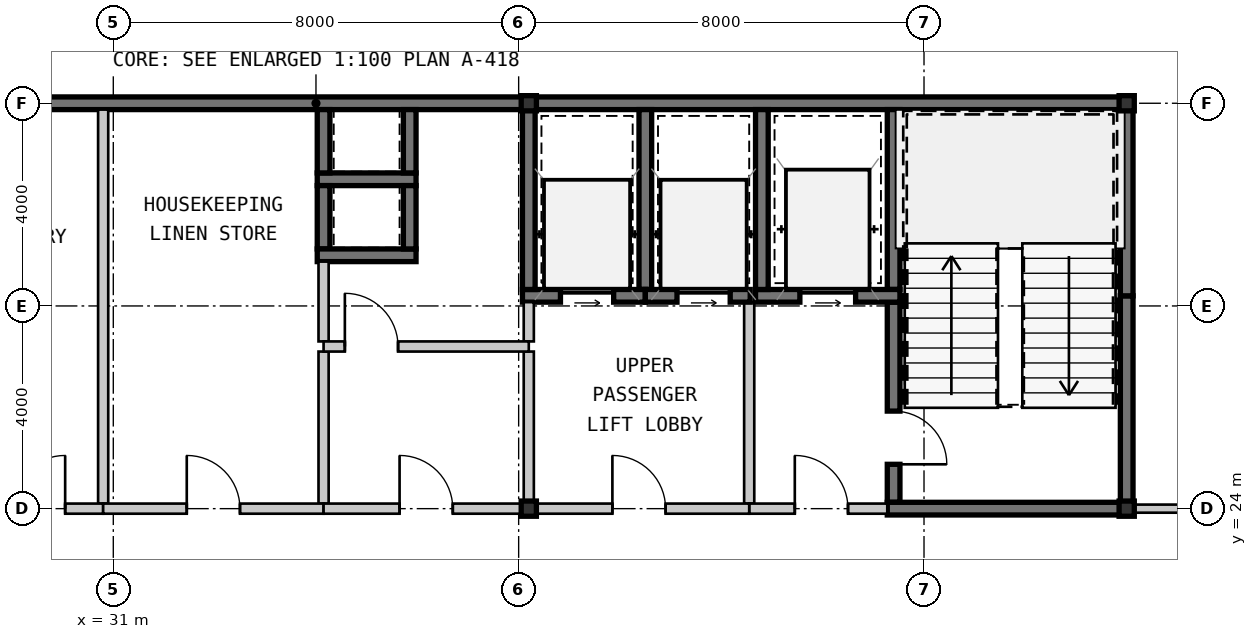
"""IFC4 building model, lengths in metres.
Left out: names, types, materials, properties, quantities, classifications, styles, units other than length and angle.
Written with IfcOpenShell. Run it as: python <this file> out.ifc"""

import sys

from ifc_helpers import new_model, si_unit, direction, frame, frame_2d, origin, origin_2d, place, context, subcontext, project, spatial, rectangle, hollow_rectangle, extrude, source, transform, mapped, element, fill, save


model = new_model("IFC4")
c1 = context("Model", 3, precision=1e-05, world=origin(), true_north=direction((0.0, 1.0)))
c2 = subcontext(c1, "Body", "Model", "MODEL_VIEW")
j1 = project(units=[si_unit("LENGTHUNIT", "METRE"), si_unit("PLANEANGLEUNIT", "RADIAN")], contexts=[c1])
p1 = place(None, origin())
s1 = spatial("IfcSite", under=j1, at=p1, CompositionType="ELEMENT")
p2 = place(p1, origin())
s2 = spatial("IfcBuilding", under=s1, at=p2, CompositionType="ELEMENT")
p3 = place(p2, frame((0.0, 0.0, 239.75)))
s3 = spatial("IfcBuildingStorey", under=s2, at=p3, CompositionType="ELEMENT", Elevation=239.75)
m1 = source(origin(), c2, "Body", "SweptSolid", [
    extrude(hollow_rectangle(XDim=0.3, YDim=0.3, WallThickness=0.012, at=origin_2d()), origin(), (0.0, 0.0, 1.0), 3.15),
])
for number, where, z_axis, x_axis in (
    (1, (39.2, 24.0, 0.0), (0.0, 0.0, 1.0), (1.0, 0.0, 0.0)),
    (2, (51.0, 24.0, 0.0), (0.0, 0.0, 1.0), (1.0, 0.0, 0.0)),
    (3, (39.2, 32.0, 0.0), (0.0, 0.0, 1.0), (1.0, 0.0, 0.0)),
    (4, (51.0, 32.0, 0.0), (0.0, 0.0, 1.0), (1.0, 0.0, 0.0)),
):
    element("IfcColumn", number, at=place(p3, frame(where, z_axis=z_axis, x_axis=x_axis)), inside=s3, PredefinedType="COLUMN", context=c2, shape_type="MappedRepresentation", body=[
        mapped(m1, transform((0.0, 0.0, 0.0), scale=1.0)),
    ])
m2 = source(origin(), c2, "Body", "SweptSolid", [
    extrude(rectangle(XDim=11.2, YDim=0.25, at=frame_2d((5.6, 0.0))), origin(), (0.0, 0.0, 1.0), 2.93),
])
p4 = place(p3, frame((28.0, 32.0, 0.0), z_axis=(0.0, 0.0, 1.0), x_axis=(1.0, 0.0, 0.0)))
e5 = element("IfcWall", 5, at=p4, inside=s3, PredefinedType="SHEAR", context=c2, shape_type="MappedRepresentation", body=[
    mapped(m2, transform((0.0, 0.0, 0.0), scale=1.0)),
])
m3 = source(origin(), c2, "Body", "SweptSolid", [
    extrude(rectangle(XDim=11.925, YDim=0.25, at=frame_2d((5.962, 0.0))), origin(), (0.0, 0.0, 1.0), 2.93),
])
p5 = place(p3, frame((39.2, 32.0, 0.0), z_axis=(0.0, 0.0, 1.0), x_axis=(1.0, 0.0, 0.0)))
e6 = element("IfcWall", 6, at=p5, inside=s3, PredefinedType="SHEAR", context=c2, shape_type="MappedRepresentation", body=[
    mapped(m3, transform((0.0, 0.0, 0.0), scale=1.0)),
])
m4 = source(origin(), c2, "Body", "SweptSolid", [
    extrude(rectangle(XDim=4.075, YDim=0.25, at=frame_2d((2.038, 0.0))), origin(), (0.0, 0.0, 1.0), 2.93),
])
p6 = place(p3, frame((51.0, 24.125, 0.0), z_axis=(0.0, 0.0, 1.0), x_axis=(0.0, 1.0, 0.0)))
e7 = element("IfcWall", 7, at=p6, inside=s3, PredefinedType="SHEAR", context=c2, shape_type="MappedRepresentation", body=[
    mapped(m4, transform((0.0, 0.0, 0.0), scale=1.0)),
])
m5 = source(origin(), c2, "Body", "SweptSolid", [
    extrude(rectangle(XDim=3.675, YDim=0.25, at=frame_2d((1.837, 0.0))), origin(), (0.0, 0.0, 1.0), 2.93),
])
p7 = place(p3, frame((51.0, 28.2, 0.0), z_axis=(0.0, 0.0, 1.0), x_axis=(0.0, 1.0, 0.0)))
e8 = element("IfcWall", 8, at=p7, inside=s3, PredefinedType="SHEAR", context=c2, shape_type="MappedRepresentation", body=[
    mapped(m5, transform((0.0, 0.0, 0.0), scale=1.0)),
])
m6 = source(origin(), c2, "Body", "SweptSolid", [
    extrude(rectangle(XDim=3.55, YDim=0.25, at=frame_2d((1.775, 0.0))), origin(), (0.0, 0.0, 1.0), 2.93),
])
p8 = place(p3, frame((46.4, 31.875, 0.0), z_axis=(0.0, 0.0, 1.0), x_axis=(0.0, -1.0, 0.0)))
e9 = element("IfcWall", 9, at=p8, inside=s3, PredefinedType="SHEAR", context=c2, shape_type="MappedRepresentation", body=[
    mapped(m6, transform((0.0, 0.0, 0.0), scale=1.0)),
])
m7 = source(origin(), c2, "Body", "SweptSolid", [
    extrude(rectangle(XDim=3.95, YDim=0.25, at=frame_2d((1.975, 0.0))), origin(), (0.0, 0.0, 1.0), 2.93),
])
p9 = place(p3, frame((46.4, 28.075, 0.0), z_axis=(0.0, 0.0, 1.0), x_axis=(0.0, -1.0, 0.0)))
e10 = element("IfcWall", 10, at=p9, inside=s3, PredefinedType="SHEAR", context=c2, shape_type="MappedRepresentation", body=[
    mapped(m7, transform((0.0, 0.0, 0.0), scale=1.0)),
])
m8 = source(origin(), c2, "Body", "SweptSolid", [
    extrude(rectangle(XDim=1.05, YDim=2.1, at=frame_2d((0.525, 1.05))), frame((0.0, 0.135, 0.0), z_axis=(0.0, -1.0, 0.0), x_axis=(1.0, 0.0, 0.0)), (0.0, 0.0, 1.0), 0.27),
])
p10 = place(p9, frame((2.15, 0.0, 0.0)))
e11 = element("IfcOpeningElement", 11, at=p10, cuts=e10, PredefinedType="OPENING", context=c2, shape_type="MappedRepresentation", body=[
    mapped(m8, transform((0.0, 0.0, 0.0), scale=1.0)),
])
m9 = source(origin(), c2, "Body", "SweptSolid", [
    extrude(rectangle(XDim=4.85, YDim=0.25, at=frame_2d((2.425, 0.0))), origin(), (0.0, 0.0, 1.0), 2.93),
])
p11 = place(p3, frame((46.275, 24.0, 0.0), z_axis=(0.0, 0.0, 1.0), x_axis=(1.0, 0.0, 0.0)))
e12 = element("IfcWall", 12, at=p11, inside=s3, PredefinedType="SHEAR", context=c2, shape_type="MappedRepresentation", body=[
    mapped(m9, transform((0.0, 0.0, 0.0), scale=1.0)),
])
m10 = source(origin(), c2, "Body", "SweptSolid", [
    extrude(rectangle(XDim=2.85, YDim=0.25, at=frame_2d((1.425, 0.0))), origin(), (0.0, 0.0, 1.0), 2.93),
])
p12 = place(p3, frame((43.675, 28.2, 0.0), z_axis=(0.0, 0.0, 1.0), x_axis=(1.0, 0.0, 0.0)))
e13 = element("IfcWall", 13, at=p12, inside=s3, PredefinedType="SHEAR", context=c2, shape_type="MappedRepresentation", body=[
    mapped(m10, transform((0.0, 0.0, 0.0), scale=1.0)),
])
m11 = source(origin(), c2, "Body", "SweptSolid", [
    extrude(rectangle(XDim=1.1, YDim=2.15, at=frame_2d((0.55, 1.075))), frame((0.0, 0.135, 0.0), z_axis=(0.0, -1.0, 0.0), x_axis=(1.0, 0.0, 0.0)), (0.0, 0.0, 1.0), 0.27),
])
p13 = place(p12, frame((0.875, 0.0, 0.0)))
e14 = element("IfcOpeningElement", 14, at=p13, cuts=e13, PredefinedType="OPENING", context=c2, shape_type="MappedRepresentation", body=[
    mapped(m11, transform((0.0, 0.0, 0.0), scale=1.0)),
])
p14 = place(p3, frame((43.8, 31.875, 0.0), z_axis=(0.0, 0.0, 1.0), x_axis=(0.0, -1.0, 0.0)))
e15 = element("IfcWall", 15, at=p14, inside=s3, PredefinedType="SHEAR", context=c2, shape_type="MappedRepresentation", body=[
    mapped(m6, transform((0.0, 0.0, 0.0), scale=1.0)),
])
m12 = source(origin(), c2, "Body", "SweptSolid", [
    extrude(rectangle(XDim=3.975, YDim=0.2, at=frame_2d((1.987, 0.0))), origin(), (0.0, 0.0, 1.0), 2.93),
])
p15 = place(p3, frame((43.55, 28.075, 0.0), z_axis=(0.0, 0.0, 1.0), x_axis=(0.0, -1.0, 0.0)))
e16 = element("IfcWall", 16, at=p15, inside=s3, PredefinedType="SOLIDWALL", context=c2, shape_type="MappedRepresentation", body=[
    mapped(m12, transform((0.0, 0.0, 0.0), scale=1.0)),
])
m13 = source(origin(), c2, "Body", "SweptSolid", [
    extrude(rectangle(XDim=2.725, YDim=0.2, at=frame_2d((1.362, 0.0))), origin(), (0.0, 0.0, 1.0), 2.397),
])
p16 = place(p3, frame((43.55, 24.0, 0.0), z_axis=(0.0, 0.0, 1.0), x_axis=(1.0, 0.0, 0.0)))
e17 = element("IfcWall", 17, at=p16, inside=s3, PredefinedType="SOLIDWALL", context=c2, shape_type="MappedRepresentation", body=[
    mapped(m13, transform((0.0, 0.0, 0.0), scale=1.0)),
])
m14 = source(origin(), c2, "Body", "SweptSolid", [
    extrude(rectangle(XDim=1.05, YDim=2.1, at=frame_2d((0.525, 1.05))), frame((0.0, 0.11, 0.0), z_axis=(0.0, -1.0, 0.0), x_axis=(1.0, 0.0, 0.0)), (0.0, 0.0, 1.0), 0.22),
])
p17 = place(p16, frame((0.9, 0.0, 0.0)))
e18 = element("IfcOpeningElement", 18, at=p17, cuts=e17, PredefinedType="OPENING", context=c2, shape_type="MappedRepresentation", body=[
    mapped(m14, transform((0.0, 0.0, 0.0), scale=1.0)),
])
m15 = source(origin(), c2, "Body", "SweptSolid", [
    extrude(rectangle(XDim=1.95, YDim=0.25, at=frame_2d((0.975, 0.0))), origin(), (0.0, 0.0, 1.0), 2.93),
])
p18 = place(p3, frame((35.025, 30.5, 0.0), z_axis=(0.0, 0.0, 1.0), x_axis=(1.0, 0.0, 0.0)))
e19 = element("IfcWall", 19, at=p18, inside=s3, PredefinedType="SHEAR", context=c2, shape_type="MappedRepresentation", body=[
    mapped(m15, transform((0.0, 0.0, 0.0), scale=1.0)),
])
m16 = source(origin(), c2, "Body", "SweptSolid", [
    extrude(rectangle(XDim=1.25, YDim=0.25, at=frame_2d((0.625, 0.0))), origin(), (0.0, 0.0, 1.0), 2.93),
])
for number, where, z_axis, x_axis in (
    (20, (35.15, 31.875, 0.0), (0.0, 0.0, 1.0), (0.0, -1.0, 0.0)),
    (21, (36.85, 30.625, 0.0), (0.0, 0.0, 1.0), (0.0, 1.0, 0.0)),
    (22, (35.15, 30.375, 0.0), (0.0, 0.0, 1.0), (0.0, -1.0, 0.0)),
):
    element("IfcWall", number, at=place(p3, frame(where, z_axis=z_axis, x_axis=x_axis)), inside=s3, PredefinedType="SHEAR", context=c2, shape_type="MappedRepresentation", body=[
        mapped(m16, transform((0.0, 0.0, 0.0), scale=1.0)),
    ])
p19 = place(p3, frame((35.025, 29.0, 0.0), z_axis=(0.0, 0.0, 1.0), x_axis=(1.0, 0.0, 0.0)))
e23 = element("IfcWall", 23, at=p19, inside=s3, PredefinedType="SHEAR", context=c2, shape_type="MappedRepresentation", body=[
    mapped(m15, transform((0.0, 0.0, 0.0), scale=1.0)),
])
p20 = place(p3, frame((36.85, 29.125, 0.0), z_axis=(0.0, 0.0, 1.0), x_axis=(0.0, 1.0, 0.0)))
e24 = element("IfcWall", 24, at=p20, inside=s3, PredefinedType="SHEAR", context=c2, shape_type="MappedRepresentation", body=[
    mapped(m16, transform((0.0, 0.0, 0.0), scale=1.0)),
])
p21 = place(p3, frame((41.5, 28.325, 0.0), z_axis=(0.0, 0.0, 1.0), x_axis=(0.0, 1.0, 0.0)))
e25 = element("IfcWall", 25, at=p21, inside=s3, PredefinedType="SHEAR", context=c2, shape_type="MappedRepresentation", body=[
    mapped(m6, transform((0.0, 0.0, 0.0), scale=1.0)),
])
m17 = source(origin(), c2, "Body", "SweptSolid", [
    extrude(rectangle(XDim=2.425, YDim=0.25, at=frame_2d((1.212, 0.0))), origin(), (0.0, 0.0, 1.0), 2.93),
])
p22 = place(p3, frame((39.075, 28.2, 0.0), z_axis=(0.0, 0.0, 1.0), x_axis=(1.0, 0.0, 0.0)))
e26 = element("IfcWall", 26, at=p22, inside=s3, PredefinedType="SHEAR", context=c2, shape_type="MappedRepresentation", body=[
    mapped(m17, transform((0.0, 0.0, 0.0), scale=1.0)),
])
m18 = source(origin(), c2, "Body", "SweptSolid", [
    extrude(rectangle(XDim=1.05, YDim=2.15, at=frame_2d((0.525, 1.075))), frame((0.0, 0.135, 0.0), z_axis=(0.0, -1.0, 0.0), x_axis=(1.0, 0.0, 0.0)), (0.0, 0.0, 1.0), 0.27),
])
p23 = place(p22, frame((0.75, 0.0, 0.0)))
e27 = element("IfcOpeningElement", 27, at=p23, cuts=e26, PredefinedType="OPENING", context=c2, shape_type="MappedRepresentation", body=[
    mapped(m18, transform((0.0, 0.0, 0.0), scale=1.0)),
])
p24 = place(p3, frame((39.2, 31.875, 0.0), z_axis=(0.0, 0.0, 1.0), x_axis=(0.0, -1.0, 0.0)))
e28 = element("IfcWall", 28, at=p24, inside=s3, PredefinedType="SHEAR", context=c2, shape_type="MappedRepresentation", body=[
    mapped(m6, transform((0.0, 0.0, 0.0), scale=1.0)),
])
m19 = source(origin(), c2, "Body", "SweptSolid", [
    extrude(rectangle(XDim=2.07, YDim=0.25, at=frame_2d((1.035, 0.0))), origin(), (0.0, 0.0, 1.0), 2.93),
])
p25 = place(p3, frame((41.5, 28.2, 0.0), z_axis=(0.0, 0.0, 1.0), x_axis=(1.0, 0.0, 0.0)))
e29 = element("IfcWall", 29, at=p25, inside=s3, PredefinedType="SHEAR", context=c2, shape_type="MappedRepresentation", body=[
    mapped(m19, transform((0.0, 0.0, 0.0), scale=1.0)),
])
p26 = place(p25, frame((0.625, 0.0, 0.0)))
e30 = element("IfcOpeningElement", 30, at=p26, cuts=e29, PredefinedType="OPENING", context=c2, shape_type="MappedRepresentation", body=[
    mapped(m18, transform((0.0, 0.0, 0.0), scale=1.0)),
])
m20 = source(origin(), c2, "Body", "SweptSolid", [
    extrude(rectangle(XDim=3.0, YDim=0.2, at=frame_2d((1.5, 0.0))), origin(), (0.0, 0.0, 1.0), 2.47),
])
p27 = place(p3, frame((39.2, 24.1, 0.0), z_axis=(0.0, 0.0, 1.0), x_axis=(0.0, 1.0, 0.0)))
e31 = element("IfcWall", 31, at=p27, inside=s3, PredefinedType="SOLIDWALL", context=c2, shape_type="MappedRepresentation", body=[
    mapped(m20, transform((0.0, 0.0, 0.0), scale=1.0)),
])
m21 = source(origin(), c2, "Body", "SweptSolid", [
    extrude(rectangle(XDim=0.775, YDim=0.2, at=frame_2d((0.387, 0.0))), origin(), (0.0, 0.0, 1.0), 2.47),
])
p28 = place(p3, frame((39.2, 27.3, 0.0), z_axis=(0.0, 0.0, 1.0), x_axis=(0.0, 1.0, 0.0)))
e32 = element("IfcWall", 32, at=p28, inside=s3, PredefinedType="SOLIDWALL", context=c2, shape_type="MappedRepresentation", body=[
    mapped(m21, transform((0.0, 0.0, 0.0), scale=1.0)),
])
m22 = source(origin(), c2, "Body", "SweptSolid", [
    extrude(rectangle(XDim=4.35, YDim=0.2, at=frame_2d((2.175, 0.0))), origin(), (0.0, 0.0, 1.0), 2.397),
])
p29 = place(p3, frame((43.55, 24.0, 0.0), z_axis=(0.0, 0.0, 1.0), x_axis=(-1.0, 0.0, 0.0)))
e33 = element("IfcWall", 33, at=p29, inside=s3, PredefinedType="SOLIDWALL", context=c2, shape_type="MappedRepresentation", body=[
    mapped(m22, transform((0.0, 0.0, 0.0), scale=1.0)),
])
p30 = place(p29, frame((1.65, 0.0, 0.0)))
e34 = element("IfcOpeningElement", 34, at=p30, cuts=e33, PredefinedType="OPENING", context=c2, shape_type="MappedRepresentation", body=[
    mapped(m14, transform((0.0, 0.0, 0.0), scale=1.0)),
])
m23 = source(origin(), c2, "Body", "SweptSolid", [
    extrude(rectangle(XDim=7.775, YDim=0.2, at=frame_2d((3.887, 0.0))), origin(), (0.0, 0.0, 1.0), 2.93),
])
p31 = place(p3, frame((30.8, 31.875, 0.0), z_axis=(0.0, 0.0, 1.0), x_axis=(0.0, -1.0, 0.0)))
e35 = element("IfcWall", 35, at=p31, inside=s3, PredefinedType="SOLIDWALL", context=c2, shape_type="MappedRepresentation", body=[
    mapped(m23, transform((0.0, 0.0, 0.0), scale=1.0)),
])
m24 = source(origin(), c2, "Body", "SweptSolid", [
    extrude(rectangle(XDim=4.35, YDim=0.2, at=frame_2d((2.175, 0.0))), origin(), (0.0, 0.0, 1.0), 2.47),
])
p32 = place(p3, frame((30.8, 24.0, 0.0), z_axis=(0.0, 0.0, 1.0), x_axis=(-1.0, 0.0, 0.0)))
e36 = element("IfcWall", 36, at=p32, inside=s3, PredefinedType="SOLIDWALL", context=c2, shape_type="MappedRepresentation", body=[
    mapped(m24, transform((0.0, 0.0, 0.0), scale=1.0)),
])
p33 = place(p32, frame((0.75, 0.0, 0.0)))
e37 = element("IfcOpeningElement", 37, at=p33, cuts=e36, PredefinedType="OPENING", context=c2, shape_type="MappedRepresentation", body=[
    mapped(m14, transform((0.0, 0.0, 0.0), scale=1.0)),
])
m25 = source(origin(), c2, "Body", "SweptSolid", [
    extrude(rectangle(XDim=3.0, YDim=0.2, at=frame_2d((1.5, 0.0))), origin(), (0.0, 0.0, 1.0), 2.93),
])
p34 = place(p3, frame((35.15, 27.1, 0.0), z_axis=(0.0, 0.0, 1.0), x_axis=(0.0, -1.0, 0.0)))
e38 = element("IfcWall", 38, at=p34, inside=s3, PredefinedType="SOLIDWALL", context=c2, shape_type="MappedRepresentation", body=[
    mapped(m25, transform((0.0, 0.0, 0.0), scale=1.0)),
])
m26 = source(origin(), c2, "Body", "SweptSolid", [
    extrude(rectangle(XDim=1.575, YDim=0.2, at=frame_2d((0.788, 0.0))), origin(), (0.0, 0.0, 1.0), 2.93),
])
p35 = place(p3, frame((35.15, 28.875, 0.0), z_axis=(0.0, 0.0, 1.0), x_axis=(0.0, -1.0, 0.0)))
e39 = element("IfcWall", 39, at=p35, inside=s3, PredefinedType="SOLIDWALL", context=c2, shape_type="MappedRepresentation", body=[
    mapped(m26, transform((0.0, 0.0, 0.0), scale=1.0)),
])
m27 = source(origin(), c2, "Body", "SweptSolid", [
    extrude(rectangle(XDim=4.35, YDim=0.2, at=frame_2d((2.175, 0.0))), origin(), (0.0, 0.0, 1.0), 2.47),
])
p36 = place(p3, frame((35.15, 24.0, 0.0), z_axis=(0.0, 0.0, 1.0), x_axis=(-1.0, 0.0, 0.0)))
e40 = element("IfcWall", 40, at=p36, inside=s3, PredefinedType="SOLIDWALL", context=c2, shape_type="MappedRepresentation", body=[
    mapped(m27, transform((0.0, 0.0, 0.0), scale=1.0)),
])
p37 = place(p36, frame((1.65, 0.0, 0.0)))
e41 = element("IfcOpeningElement", 41, at=p37, cuts=e40, PredefinedType="OPENING", context=c2, shape_type="MappedRepresentation", body=[
    mapped(m14, transform((0.0, 0.0, 0.0), scale=1.0)),
])
m28 = source(origin(), c2, "Body", "SweptSolid", [
    extrude(rectangle(XDim=4.05, YDim=0.2, at=frame_2d((2.025, 0.0))), origin(), (0.0, 0.0, 1.0), 2.93),
])
p38 = place(p3, frame((35.15, 27.2, 0.0), z_axis=(0.0, 0.0, 1.0), x_axis=(1.0, 0.0, 0.0)))
e42 = element("IfcWall", 42, at=p38, inside=s3, PredefinedType="SOLIDWALL", context=c2, shape_type="MappedRepresentation", body=[
    mapped(m28, transform((0.0, 0.0, 0.0), scale=1.0)),
])
p39 = place(p38, frame((0.42, 0.0, 0.0)))
e43 = element("IfcOpeningElement", 43, at=p39, cuts=e42, PredefinedType="OPENING", context=c2, shape_type="MappedRepresentation", body=[
    mapped(m14, transform((0.0, 0.0, 0.0), scale=1.0)),
])
m29 = source(origin(), c2, "Body", "SweptSolid", [
    extrude(rectangle(XDim=4.05, YDim=0.2, at=frame_2d((2.025, 0.0))), origin(), (0.0, 0.0, 1.0), 2.47),
])
p40 = place(p3, frame((39.2, 24.0, 0.0), z_axis=(0.0, 0.0, 1.0), x_axis=(-1.0, 0.0, 0.0)))
e44 = element("IfcWall", 44, at=p40, inside=s3, PredefinedType="SOLIDWALL", context=c2, shape_type="MappedRepresentation", body=[
    mapped(m29, transform((0.0, 0.0, 0.0), scale=1.0)),
])
p41 = place(p40, frame((1.5, 0.0, 0.0)))
e45 = element("IfcOpeningElement", 45, at=p41, cuts=e44, PredefinedType="OPENING", context=c2, shape_type="MappedRepresentation", body=[
    mapped(m14, transform((0.0, 0.0, 0.0), scale=1.0)),
])
m30 = source(origin(), c2, "Body", "SweptSolid", [
    extrude(rectangle(XDim=6.378, YDim=0.16, at=frame_2d((3.189, 0.0))), origin(), (0.0, 0.0, 1.0), 2.93),
])
p42 = place(p3, frame((51.125, 24.0, 0.0), z_axis=(0.0, 0.0, 1.0), x_axis=(1.0, 0.0, 0.0)))
e46 = element("IfcWall", 46, at=p42, inside=s3, PredefinedType="PARTITIONING", context=c2, shape_type="MappedRepresentation", body=[
    mapped(m30, transform((0.0, 0.0, 0.0), scale=1.0)),
])
m31 = source(origin(), c2, "Body", "SweptSolid", [
    extrude(rectangle(XDim=0.92, YDim=2.1, at=frame_2d((0.46, 1.05))), frame((0.0, 0.09, 0.0), z_axis=(0.0, -1.0, 0.0), x_axis=(1.0, 0.0, 0.0)), (0.0, 0.0, 1.0), 0.18),
])
p43 = place(p42, frame((2.677, 0.0, 0.0)))
e47 = element("IfcOpeningElement", 47, at=p43, cuts=e46, PredefinedType="OPENING", context=c2, shape_type="MappedRepresentation", body=[
    mapped(m31, transform((0.0, 0.0, 0.0), scale=1.0)),
])
m32 = source(origin(), c2, "Body", "SweptSolid", [
    extrude(rectangle(XDim=1.05, YDim=2.1, at=frame_2d((0.525, 1.05))), frame((0.0, 0.025, 0.0), z_axis=(0.0, -1.0, 0.0), x_axis=(1.0, 0.0, 0.0)), (0.0, 0.0, 1.0), 0.05),
])
p44 = place(p10, origin())
e48 = element("IfcDoor", 48, at=p44, inside=s3, OperationType="SINGLE_SWING_RIGHT", PredefinedType="DOOR", context=c2, shape_type="MappedRepresentation", body=[
    mapped(m32, transform((0.0, 0.0, 0.0), scale=1.0)),
])
fill(e11, e48)
m33 = source(origin(), c2, "Body", "SweptSolid", [
    extrude(rectangle(XDim=1.1, YDim=2.15, at=frame_2d((0.55, 1.075))), frame((0.0, 0.025, 0.0), z_axis=(0.0, -1.0, 0.0), x_axis=(1.0, 0.0, 0.0)), (0.0, 0.0, 1.0), 0.05),
])
p45 = place(p13, origin())
e49 = element("IfcDoor", 49, at=p45, inside=s3, OperationType="SLIDING_TO_LEFT", PredefinedType="DOOR", context=c2, shape_type="MappedRepresentation", body=[
    mapped(m33, transform((0.0, 0.0, 0.0), scale=1.0)),
])
fill(e14, e49)
p46 = place(p17, origin())
e50 = element("IfcDoor", 50, at=p46, inside=s3, OperationType="SINGLE_SWING_LEFT", PredefinedType="DOOR", context=c2, shape_type="MappedRepresentation", body=[
    mapped(m32, transform((0.0, 0.0, 0.0), scale=1.0)),
])
fill(e18, e50)
m34 = source(origin(), c2, "Body", "SweptSolid", [
    extrude(rectangle(XDim=1.05, YDim=2.15, at=frame_2d((0.525, 1.075))), frame((0.0, 0.025, 0.0), z_axis=(0.0, -1.0, 0.0), x_axis=(1.0, 0.0, 0.0)), (0.0, 0.0, 1.0), 0.05),
])
p47 = place(p23, origin())
e51 = element("IfcDoor", 51, at=p47, inside=s3, OperationType="SLIDING_TO_LEFT", PredefinedType="DOOR", context=c2, shape_type="MappedRepresentation", body=[
    mapped(m34, transform((0.0, 0.0, 0.0), scale=1.0)),
])
fill(e27, e51)
p48 = place(p26, origin())
e52 = element("IfcDoor", 52, at=p48, inside=s3, OperationType="SLIDING_TO_LEFT", PredefinedType="DOOR", context=c2, shape_type="MappedRepresentation", body=[
    mapped(m34, transform((0.0, 0.0, 0.0), scale=1.0)),
])
fill(e30, e52)
p49 = place(p30, frame((1.05, 0.0, 0.0), z_axis=(0.0, 0.0, 1.0), x_axis=(-1.0, 0.0, 0.0)))
e53 = element("IfcDoor", 53, at=p49, inside=s3, OperationType="SINGLE_SWING_LEFT", PredefinedType="DOOR", context=c2, shape_type="MappedRepresentation", body=[
    mapped(m32, transform((0.0, 0.0, 0.0), scale=1.0)),
])
fill(e34, e53)
p50 = place(p33, frame((1.05, 0.0, 0.0), z_axis=(0.0, 0.0, 1.0), x_axis=(-1.0, 0.0, 0.0)))
e54 = element("IfcDoor", 54, at=p50, inside=s3, OperationType="SINGLE_SWING_RIGHT", PredefinedType="DOOR", context=c2, shape_type="MappedRepresentation", body=[
    mapped(m32, transform((0.0, 0.0, 0.0), scale=1.0)),
])
fill(e37, e54)
p51 = place(p37, frame((1.05, 0.0, 0.0), z_axis=(0.0, 0.0, 1.0), x_axis=(-1.0, 0.0, 0.0)))
e55 = element("IfcDoor", 55, at=p51, inside=s3, OperationType="SINGLE_SWING_LEFT", PredefinedType="DOOR", context=c2, shape_type="MappedRepresentation", body=[
    mapped(m32, transform((0.0, 0.0, 0.0), scale=1.0)),
])
fill(e41, e55)
p52 = place(p39, origin())
e56 = element("IfcDoor", 56, at=p52, inside=s3, OperationType="SINGLE_SWING_LEFT", PredefinedType="DOOR", context=c2, shape_type="MappedRepresentation", body=[
    mapped(m32, transform((0.0, 0.0, 0.0), scale=1.0)),
])
fill(e43, e56)
p53 = place(p41, frame((1.05, 0.0, 0.0), z_axis=(0.0, 0.0, 1.0), x_axis=(-1.0, 0.0, 0.0)))
e57 = element("IfcDoor", 57, at=p53, inside=s3, OperationType="SINGLE_SWING_LEFT", PredefinedType="DOOR", context=c2, shape_type="MappedRepresentation", body=[
    mapped(m32, transform((0.0, 0.0, 0.0), scale=1.0)),
])
fill(e45, e57)
save(model, sys.argv[1])
